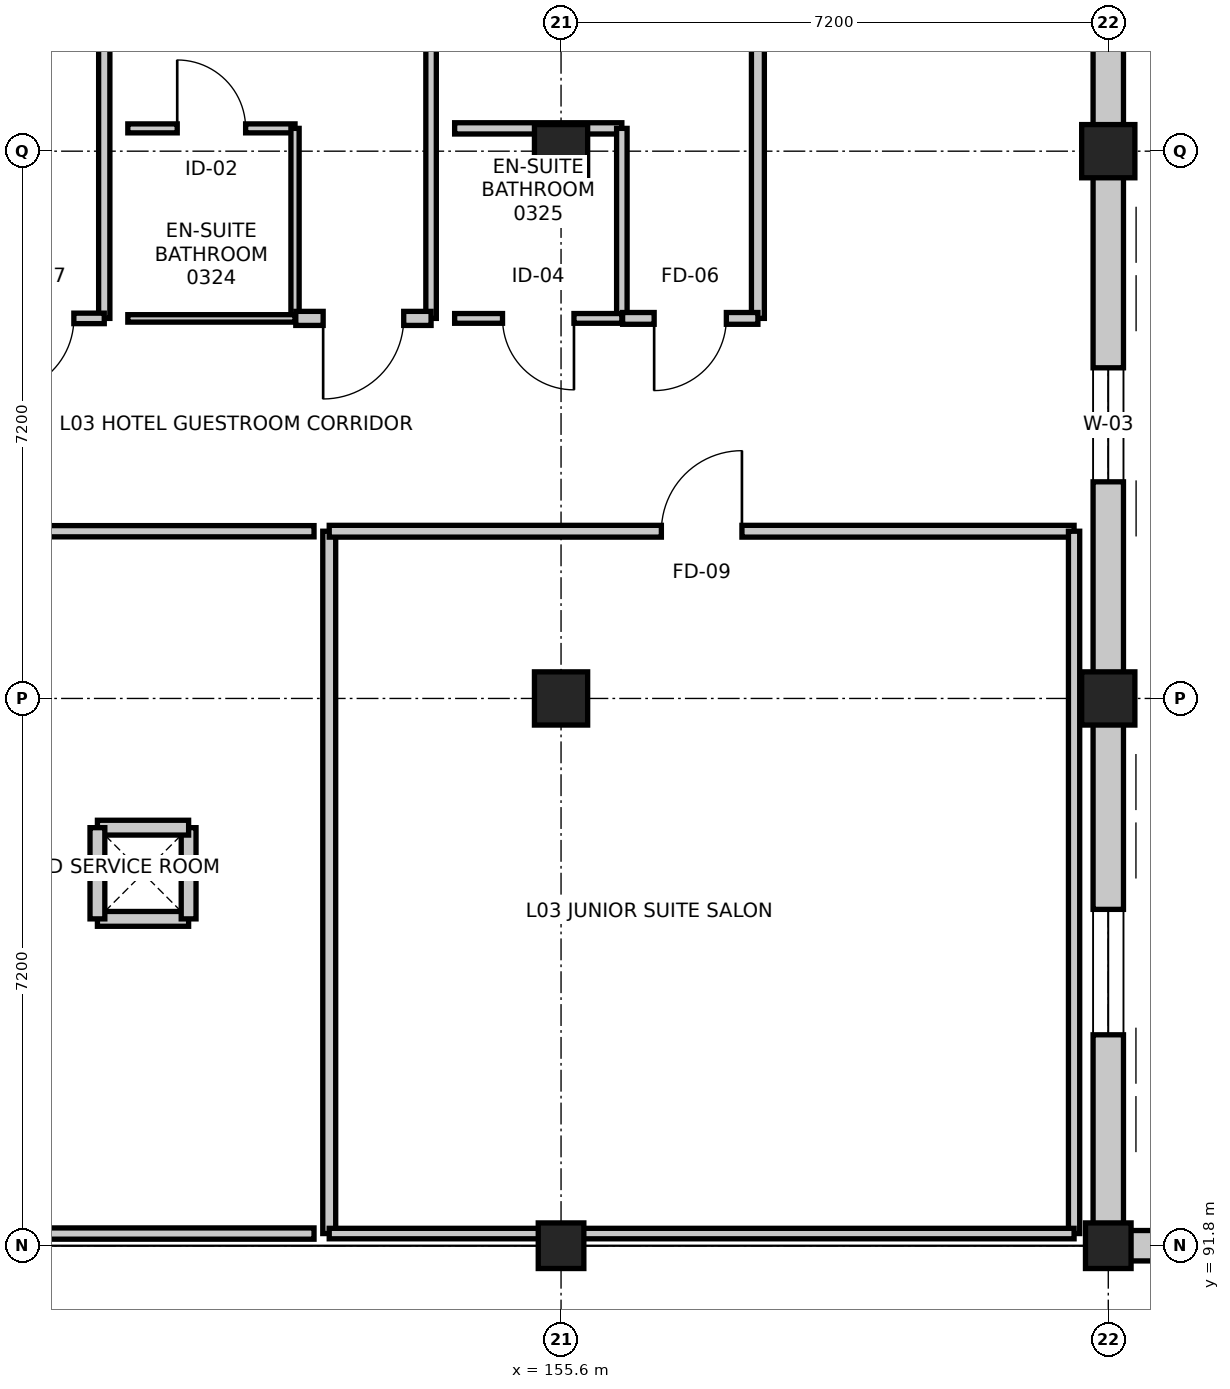
"""IFC4 building model, lengths in metres.
Left out: names, types, materials, properties, quantities, classifications, styles, units other than length and angle.
Written with IfcOpenShell. Run it as: python <this file> out.ifc"""

import sys

from ifc_helpers import new_model, si_unit, direction, frame, frame_2d, origin, origin_2d, place, context, subcontext, project, spatial, rectangle, extrude, element, fill, save


model = new_model("IFC4")
c1 = context("Model", 3, precision=1e-05, world=origin(), true_north=direction((0.0, 1.0)))
c2 = subcontext(c1, "Body", "Model", "MODEL_VIEW")
j1 = project(units=[si_unit("LENGTHUNIT", "METRE"), si_unit("PLANEANGLEUNIT", "RADIAN")], contexts=[c1])
p1 = place(None, origin())
s1 = spatial("IfcSite", under=j1, at=p1, CompositionType="ELEMENT")
p2 = place(p1, origin())
s2 = spatial("IfcBuilding", under=s1, at=p2, CompositionType="ELEMENT")
p3 = place(p2, frame((0.0, 0.0, 15.0)))
s3 = spatial("IfcBuildingStorey", under=s2, at=p3, CompositionType="ELEMENT", Elevation=15.0)
p4 = place(p3, frame((155.6, 91.8, 0.0), z_axis=(0.0, 0.0, 1.0), x_axis=(1.0, 0.0, 0.0)))
e1 = element("IfcColumn", 1, at=p4, inside=s3, PredefinedType="COLUMN", context=c2, shape_type="SweptSolid", body=[
    extrude(rectangle(XDim=0.6, YDim=0.6, at=origin_2d()), origin(), (0.0, 0.0, 1.0), 4.2),
])
for number, where, z_axis, x_axis in (
    (2, (155.6, 99.0, 0.0), (0.0, 0.0, 1.0), (1.0, 0.0, 0.0)),
    (3, (155.6, 106.2, 0.0), (0.0, 0.0, 1.0), (1.0, 0.0, 0.0)),
):
    element("IfcColumn", number, at=place(p3, frame(where, z_axis=z_axis, x_axis=x_axis)), inside=s3, PredefinedType="COLUMN", context=c2, shape_type="SweptSolid", body=[
        extrude(rectangle(XDim=0.7, YDim=0.7, at=origin_2d()), origin(), (0.0, 0.0, 1.0), 4.2),
    ])
p5 = place(p3, frame((162.8, 91.8, 0.0), z_axis=(0.0, 0.0, 1.0), x_axis=(1.0, 0.0, 0.0)))
e4 = element("IfcColumn", 4, at=p5, inside=s3, PredefinedType="COLUMN", context=c2, shape_type="SweptSolid", body=[
    extrude(rectangle(XDim=0.6, YDim=0.6, at=origin_2d()), origin(), (0.0, 0.0, 1.0), 4.2),
])
for number, where, z_axis, x_axis in (
    (5, (162.8, 99.0, 0.0), (0.0, 0.0, 1.0), (1.0, 0.0, 0.0)),
    (6, (162.8, 106.2, 0.0), (0.0, 0.0, 1.0), (1.0, 0.0, 0.0)),
):
    element("IfcColumn", number, at=place(p3, frame(where, z_axis=z_axis, x_axis=x_axis)), inside=s3, PredefinedType="COLUMN", context=c2, shape_type="SweptSolid", body=[
        extrude(rectangle(XDim=0.7, YDim=0.7, at=origin_2d()), origin(), (0.0, 0.0, 1.0), 4.2),
    ])
p6 = place(p3, frame((162.8, 113.4, 0.0), z_axis=(0.0, 0.0, 1.0), x_axis=(0.0, -1.0, 0.0)))
e7 = element("IfcWall", 7, at=p6, inside=s3, PredefinedType="STANDARD", context=c2, shape_type="SweptSolid", body=[
    extrude(rectangle(XDim=7.2, YDim=0.4, at=frame_2d((3.6, 0.0))), origin(), (0.0, 0.0, 1.0), 3.275),
])
p7 = place(p6, frame((2.925, 0.0, 0.9)))
e8 = element("IfcOpeningElement", 8, at=p7, cuts=e7, PredefinedType="OPENING", context=c2, shape_type="SweptSolid", body=[
    extrude(rectangle(XDim=1.35, YDim=1.8, at=frame_2d((0.675, 0.9))), frame((0.0, 0.21, 0.0), z_axis=(0.0, -1.0, 0.0), x_axis=(1.0, 0.0, 0.0)), (0.0, 0.0, 1.0), 0.42),
])
p8 = place(p3, frame((162.8, 106.2, 0.0), z_axis=(0.0, 0.0, 1.0), x_axis=(0.0, -1.0, 0.0)))
e9 = element("IfcWall", 9, at=p8, inside=s3, PredefinedType="STANDARD", context=c2, shape_type="SweptSolid", body=[
    extrude(rectangle(XDim=7.2, YDim=0.4, at=frame_2d((3.6, 0.0))), origin(), (0.0, 0.0, 1.0), 3.275),
])
p9 = place(p8, frame((2.85, 0.0, 0.9)))
e10 = element("IfcOpeningElement", 10, at=p9, cuts=e9, PredefinedType="OPENING", context=c2, shape_type="SweptSolid", body=[
    extrude(rectangle(XDim=1.5, YDim=1.8, at=frame_2d((0.75, 0.9))), frame((0.0, 0.21, 0.0), z_axis=(0.0, -1.0, 0.0), x_axis=(1.0, 0.0, 0.0)), (0.0, 0.0, 1.0), 0.42),
])
p10 = place(p3, frame((162.8, 99.0, 0.0), z_axis=(0.0, 0.0, 1.0), x_axis=(0.0, -1.0, 0.0)))
e11 = element("IfcWall", 11, at=p10, inside=s3, PredefinedType="STANDARD", context=c2, shape_type="SweptSolid", body=[
    extrude(rectangle(XDim=7.2, YDim=0.4, at=frame_2d((3.6, 0.0))), origin(), (0.0, 0.0, 1.0), 3.275),
])
p11 = place(p10, frame((2.775, 0.0, 0.9)))
e12 = element("IfcOpeningElement", 12, at=p11, cuts=e11, PredefinedType="OPENING", context=c2, shape_type="SweptSolid", body=[
    extrude(rectangle(XDim=1.65, YDim=1.8, at=frame_2d((0.825, 0.9))), frame((0.0, 0.21, 0.0), z_axis=(0.0, -1.0, 0.0), x_axis=(1.0, 0.0, 0.0)), (0.0, 0.0, 1.0), 0.42),
])
p12 = place(p3, frame((162.8, 91.8, 0.0), z_axis=(0.0, 0.0, 1.0), x_axis=(1.0, 0.0, 0.0)))
e13 = element("IfcWall", 13, at=p12, inside=s3, PredefinedType="STANDARD", context=c2, shape_type="SweptSolid", body=[
    extrude(rectangle(XDim=7.2, YDim=0.4, at=frame_2d((3.6, 0.0))), origin(), (0.0, 0.0, 1.0), 3.325),
])
p13 = place(p12, frame((2.7, 0.0, 0.9)))
e14 = element("IfcOpeningElement", 14, at=p13, cuts=e13, PredefinedType="OPENING", context=c2, shape_type="SweptSolid", body=[
    extrude(rectangle(XDim=1.8, YDim=1.8, at=frame_2d((0.9, 0.9))), frame((0.0, 0.21, 0.0), z_axis=(0.0, -1.0, 0.0), x_axis=(1.0, 0.0, 0.0)), (0.0, 0.0, 1.0), 0.42),
])
p14 = place(p12, frame((4.95, 0.0, 0.85)))
e15 = element("IfcOpeningElement", 15, at=p14, cuts=e13, PredefinedType="OPENING", context=c2, shape_type="SweptSolid", body=[
    extrude(rectangle(XDim=1.2, YDim=1.8, at=frame_2d((0.6, 0.9))), frame((0.0, 0.21, 0.0), z_axis=(0.0, -1.0, 0.0), x_axis=(1.0, 0.0, 0.0)), (0.0, 0.0, 1.0), 0.42),
])
for number, where, z_axis, x_axis in (
    (16, (149.5, 96.1, 0.0), (0.0, 0.0, 1.0), (1.0, 0.0, 0.0)),
    (17, (150.7, 96.1, 0.0), (0.0, 0.0, 1.0), (0.0, 1.0, 0.0)),
    (18, (150.7, 97.3, 0.0), (0.0, 0.0, 1.0), (-1.0, 0.0, 0.0)),
    (19, (149.5, 97.3, 0.0), (0.0, 0.0, 1.0), (0.0, -1.0, 0.0)),
):
    element("IfcWall", number, at=place(p3, frame(where, z_axis=z_axis, x_axis=x_axis)), inside=s3, PredefinedType="PARAPET", context=c2, shape_type="SweptSolid", body=[
        extrude(rectangle(XDim=1.2, YDim=0.195, at=frame_2d((0.6, 0.0))), origin(), (0.0, 0.0, 1.0), 3.8),
    ])
p15 = place(p3, frame((152.55, 91.96, 0.0), z_axis=(0.0, 0.0, 1.0), x_axis=(0.0, 1.0, 0.0)))
e20 = element("IfcWall", 20, at=p15, inside=s3, PredefinedType="PARTITIONING", context=c2, shape_type="SweptSolid", body=[
    extrude(rectangle(XDim=9.24, YDim=0.17, at=frame_2d((4.62, 0.0))), origin(), (0.0, 0.0, 1.0), 3.325),
])
p16 = place(p3, frame((152.55, 101.2, 0.0), z_axis=(0.0, 0.0, 1.0), x_axis=(1.0, 0.0, 0.0)))
e21 = element("IfcWall", 21, at=p16, inside=s3, PredefinedType="PARTITIONING", context=c2, shape_type="SweptSolid", body=[
    extrude(rectangle(XDim=9.8, YDim=0.155, at=frame_2d((4.9, 0.0))), origin(), (0.0, 0.0, 1.0), 3.275),
])
p17 = place(p16, frame((4.37, 0.0, 0.0)))
e22 = element("IfcOpeningElement", 22, at=p17, cuts=e21, PredefinedType="OPENING", context=c2, shape_type="SweptSolid", body=[
    extrude(rectangle(XDim=1.06, YDim=2.2, at=frame_2d((0.53, 1.1))), frame((0.0, 0.087, 0.0), z_axis=(0.0, -1.0, 0.0), x_axis=(1.0, 0.0, 0.0)), (0.0, 0.0, 1.0), 0.175),
])
p18 = place(p3, frame((162.35, 101.2, 0.0), z_axis=(0.0, 0.0, 1.0), x_axis=(0.0, -1.0, 0.0)))
e23 = element("IfcWall", 23, at=p18, inside=s3, PredefinedType="PARTITIONING", context=c2, shape_type="SweptSolid", body=[
    extrude(rectangle(XDim=9.24, YDim=0.148, at=frame_2d((4.62, 0.0))), origin(), (0.0, 0.0, 1.0), 3.325),
])
p19 = place(p3, frame((162.35, 91.96, 0.0), z_axis=(0.0, 0.0, 1.0), x_axis=(-1.0, 0.0, 0.0)))
e24 = element("IfcWall", 24, at=p19, inside=s3, PredefinedType="PARTITIONING", context=c2, shape_type="SweptSolid", body=[
    extrude(rectangle(XDim=9.8, YDim=0.138, at=frame_2d((4.9, 0.0))), origin(), (0.0, 0.0, 1.0), 3.325),
])
p20 = place(p3, frame((152.35, 91.96, 0.0), z_axis=(0.0, 0.0, 1.0), x_axis=(-1.0, 0.0, 0.0)))
e25 = element("IfcWall", 25, at=p20, inside=s3, PredefinedType="PARTITIONING", context=c2, shape_type="SweptSolid", body=[
    extrude(rectangle(XDim=24.99, YDim=0.148, at=frame_2d((12.495, 0.0))), origin(), (0.0, 0.0, 1.0), 3.325),
])
p21 = place(p3, frame((138.21, 101.2, 0.0), z_axis=(0.0, 0.0, 1.0), x_axis=(1.0, 0.0, 0.0)))
e26 = element("IfcWall", 26, at=p21, inside=s3, PredefinedType="PARTITIONING", context=c2, shape_type="SweptSolid", body=[
    extrude(rectangle(XDim=14.14, YDim=0.148, at=frame_2d((7.07, 0.0))), origin(), (0.0, 0.0, 1.0), 3.275),
])
p22 = place(p3, frame((149.59, 113.55, 0.0), z_axis=(0.0, 0.0, 1.0), x_axis=(0.0, -1.0, 0.0)))
e27 = element("IfcWall", 27, at=p22, inside=s3, PredefinedType="PARTITIONING", context=c2, shape_type="SweptSolid", body=[
    extrude(rectangle(XDim=9.55, YDim=0.148, at=frame_2d((4.775, 0.0))), origin(), (0.0, 0.0, 1.0), 3.325),
])
p23 = place(p3, frame((149.59, 104.0, 0.0), z_axis=(0.0, 0.0, 1.0), x_axis=(-1.0, 0.0, 0.0)))
e28 = element("IfcWall", 28, at=p23, inside=s3, PredefinedType="PARTITIONING", context=c2, shape_type="SweptSolid", body=[
    extrude(rectangle(XDim=1.78, YDim=0.138, at=frame_2d((0.89, 0.0))), origin(), (0.0, 0.0, 1.0), 3.275),
])
p24 = place(p23, frame((0.4, 0.0, 0.0)))
e29 = element("IfcOpeningElement", 29, at=p24, cuts=e28, PredefinedType="OPENING", context=c2, shape_type="SweptSolid", body=[
    extrude(rectangle(XDim=0.98, YDim=2.15, at=frame_2d((0.49, 1.075))), frame((0.0, 0.079, 0.0), z_axis=(0.0, -1.0, 0.0), x_axis=(1.0, 0.0, 0.0)), (0.0, 0.0, 1.0), 0.158),
])
p25 = place(p3, frame((149.9, 106.5, 0.0), z_axis=(0.0, 0.0, 1.0), x_axis=(1.0, 0.0, 0.0)))
e30 = element("IfcWall", 30, at=p25, inside=s3, PredefinedType="PARTITIONING", context=c2, shape_type="SweptSolid", body=[
    extrude(rectangle(XDim=2.2, YDim=0.118, at=frame_2d((1.1, 0.0))), origin(), (0.0, 0.0, 1.0), 3.94),
])
p26 = place(p25, frame((0.65, 0.0, 0.0)))
e31 = element("IfcOpeningElement", 31, at=p26, cuts=e30, PredefinedType="OPENING", context=c2, shape_type="SweptSolid", body=[
    extrude(rectangle(XDim=0.9, YDim=2.08, at=frame_2d((0.45, 1.04))), frame((0.0, 0.069, 0.0), z_axis=(0.0, -1.0, 0.0), x_axis=(1.0, 0.0, 0.0)), (0.0, 0.0, 1.0), 0.138),
])
p27 = place(p3, frame((152.1, 106.5, 0.0), z_axis=(0.0, 0.0, 1.0), x_axis=(0.0, -1.0, 0.0)))
e32 = element("IfcWall", 32, at=p27, inside=s3, PredefinedType="PARTITIONING", context=c2, shape_type="SweptSolid", body=[
    extrude(rectangle(XDim=2.5, YDim=0.108, at=frame_2d((1.25, 0.0))), origin(), (0.0, 0.0, 1.0), 3.325),
])
p28 = place(p3, frame((152.1, 104.0, 0.0), z_axis=(0.0, 0.0, 1.0), x_axis=(-1.0, 0.0, 0.0)))
e33 = element("IfcWall", 33, at=p28, inside=s3, PredefinedType="PARTITIONING", context=c2, shape_type="SweptSolid", body=[
    extrude(rectangle(XDim=2.2, YDim=0.098, at=frame_2d((1.1, 0.0))), origin(), (0.0, 0.0, 1.0), 3.94),
])
p29 = place(p3, frame((153.89, 113.294, 0.0), z_axis=(0.0, 0.0, 1.0), x_axis=(0.0, -1.0, 0.0)))
e34 = element("IfcWall", 34, at=p29, inside=s3, PredefinedType="PARTITIONING", context=c2, shape_type="SweptSolid", body=[
    extrude(rectangle(XDim=9.294, YDim=0.138, at=frame_2d((4.647, 0.0))), origin(), (0.0, 0.0, 1.0), 3.325),
])
p30 = place(p3, frame((153.89, 104.0, 0.0), z_axis=(0.0, 0.0, 1.0), x_axis=(-1.0, 0.0, 0.0)))
e35 = element("IfcWall", 35, at=p30, inside=s3, PredefinedType="PARTITIONING", context=c2, shape_type="SweptSolid", body=[
    extrude(rectangle(XDim=1.78, YDim=0.185, at=frame_2d((0.89, 0.0))), origin(), (0.0, 0.0, 1.0), 3.94),
])
p31 = place(p30, frame((0.36, 0.0, 0.0)))
e36 = element("IfcOpeningElement", 36, at=p31, cuts=e35, PredefinedType="OPENING", context=c2, shape_type="SweptSolid", body=[
    extrude(rectangle(XDim=1.06, YDim=2.2, at=frame_2d((0.53, 1.1))), frame((0.0, 0.103, 0.0), z_axis=(0.0, -1.0, 0.0), x_axis=(1.0, 0.0, 0.0)), (0.0, 0.0, 1.0), 0.205),
])
p32 = place(p3, frame((154.2, 106.5, 0.0), z_axis=(0.0, 0.0, 1.0), x_axis=(1.0, 0.0, 0.0)))
e37 = element("IfcWall", 37, at=p32, inside=s3, PredefinedType="PARTITIONING", context=c2, shape_type="SweptSolid", body=[
    extrude(rectangle(XDim=2.2, YDim=0.148, at=frame_2d((1.1, 0.0))), origin(), (0.0, 0.0, 1.0), 3.275),
])
p33 = place(p3, frame((156.4, 106.5, 0.0), z_axis=(0.0, 0.0, 1.0), x_axis=(0.0, -1.0, 0.0)))
e38 = element("IfcWall", 38, at=p33, inside=s3, PredefinedType="PARTITIONING", context=c2, shape_type="SweptSolid", body=[
    extrude(rectangle(XDim=2.5, YDim=0.138, at=frame_2d((1.25, 0.0))), origin(), (0.0, 0.0, 1.0), 3.325),
])
p34 = place(p3, frame((156.4, 104.0, 0.0), z_axis=(0.0, 0.0, 1.0), x_axis=(-1.0, 0.0, 0.0)))
e39 = element("IfcWall", 39, at=p34, inside=s3, PredefinedType="PARTITIONING", context=c2, shape_type="SweptSolid", body=[
    extrude(rectangle(XDim=2.2, YDim=0.128, at=frame_2d((1.1, 0.0))), origin(), (0.0, 0.0, 1.0), 3.275),
])
p35 = place(p34, frame((0.63, 0.0, 0.0)))
e40 = element("IfcOpeningElement", 40, at=p35, cuts=e39, PredefinedType="OPENING", context=c2, shape_type="SweptSolid", body=[
    extrude(rectangle(XDim=0.94, YDim=2.12, at=frame_2d((0.47, 1.06))), frame((0.0, 0.074, 0.0), z_axis=(0.0, -1.0, 0.0), x_axis=(1.0, 0.0, 0.0)), (0.0, 0.0, 1.0), 0.148),
])
p36 = place(p3, frame((158.19, 113.084, 0.0), z_axis=(0.0, 0.0, 1.0), x_axis=(0.0, -1.0, 0.0)))
e41 = element("IfcWall", 41, at=p36, inside=s3, PredefinedType="PARTITIONING", context=c2, shape_type="SweptSolid", body=[
    extrude(rectangle(XDim=9.084, YDim=0.17, at=frame_2d((4.542, 0.0))), origin(), (0.0, 0.0, 1.0), 3.325),
])
p37 = place(p3, frame((158.19, 104.0, 0.0), z_axis=(0.0, 0.0, 1.0), x_axis=(-1.0, 0.0, 0.0)))
e42 = element("IfcWall", 42, at=p37, inside=s3, PredefinedType="PARTITIONING", context=c2, shape_type="SweptSolid", body=[
    extrude(rectangle(XDim=1.78, YDim=0.155, at=frame_2d((0.89, 0.0))), origin(), (0.0, 0.0, 1.0), 3.94),
])
p38 = place(p37, frame((0.415, 0.0, 0.0)))
e43 = element("IfcOpeningElement", 43, at=p38, cuts=e42, PredefinedType="OPENING", context=c2, shape_type="SweptSolid", body=[
    extrude(rectangle(XDim=0.95, YDim=2.1, at=frame_2d((0.475, 1.05))), frame((0.0, 0.087, 0.0), z_axis=(0.0, -1.0, 0.0), x_axis=(1.0, 0.0, 0.0)), (0.0, 0.0, 1.0), 0.175),
])
p39 = place(p9, origin())
e44 = element("IfcWindow", 44, at=p39, inside=s3, PartitioningType="SINGLE_PANEL", PredefinedType="WINDOW", context=c2, shape_type="SweptSolid", body=[
    extrude(rectangle(XDim=1.5, YDim=1.8, at=frame_2d((0.75, 0.9))), frame((0.0, 0.03, 0.0), z_axis=(0.0, -1.0, 0.0), x_axis=(1.0, 0.0, 0.0)), (0.0, 0.0, 1.0), 0.06),
])
fill(e10, e44)
p40 = place(p11, origin())
e45 = element("IfcWindow", 45, at=p40, inside=s3, PartitioningType="SINGLE_PANEL", PredefinedType="WINDOW", context=c2, shape_type="SweptSolid", body=[
    extrude(rectangle(XDim=1.65, YDim=1.8, at=frame_2d((0.825, 0.9))), frame((0.0, 0.03, 0.0), z_axis=(0.0, -1.0, 0.0), x_axis=(1.0, 0.0, 0.0)), (0.0, 0.0, 1.0), 0.06),
])
fill(e12, e45)
p41 = place(p17, origin())
e46 = element("IfcDoor", 46, at=p41, inside=s3, OperationType="SINGLE_SWING_RIGHT", PredefinedType="DOOR", context=c2, shape_type="SweptSolid", body=[
    extrude(rectangle(XDim=1.06, YDim=2.2, at=frame_2d((0.53, 1.1))), frame((0.0, 0.025, 0.0), z_axis=(0.0, -1.0, 0.0), x_axis=(1.0, 0.0, 0.0)), (0.0, 0.0, 1.0), 0.05),
])
fill(e22, e46)
p42 = place(p24, origin())
e47 = element("IfcDoor", 47, at=p42, inside=s3, OperationType="SINGLE_SWING_RIGHT", PredefinedType="DOOR", context=c2, shape_type="SweptSolid", body=[
    extrude(rectangle(XDim=0.98, YDim=2.15, at=frame_2d((0.49, 1.075))), frame((0.0, 0.025, 0.0), z_axis=(0.0, -1.0, 0.0), x_axis=(1.0, 0.0, 0.0)), (0.0, 0.0, 1.0), 0.05),
])
fill(e29, e47)
p43 = place(p26, origin())
e48 = element("IfcDoor", 48, at=p43, inside=s3, OperationType="SINGLE_SWING_LEFT", PredefinedType="DOOR", context=c2, shape_type="SweptSolid", body=[
    extrude(rectangle(XDim=0.9, YDim=2.08, at=frame_2d((0.45, 1.04))), frame((0.0, 0.025, 0.0), z_axis=(0.0, -1.0, 0.0), x_axis=(1.0, 0.0, 0.0)), (0.0, 0.0, 1.0), 0.05),
])
fill(e31, e48)
p44 = place(p31, origin())
e49 = element("IfcDoor", 49, at=p44, inside=s3, OperationType="SINGLE_SWING_RIGHT", PredefinedType="DOOR", context=c2, shape_type="SweptSolid", body=[
    extrude(rectangle(XDim=1.06, YDim=2.2, at=frame_2d((0.53, 1.1))), frame((0.0, 0.025, 0.0), z_axis=(0.0, -1.0, 0.0), x_axis=(1.0, 0.0, 0.0)), (0.0, 0.0, 1.0), 0.05),
])
fill(e36, e49)
p45 = place(p35, origin())
e50 = element("IfcDoor", 50, at=p45, inside=s3, OperationType="SINGLE_SWING_LEFT", PredefinedType="DOOR", context=c2, shape_type="SweptSolid", body=[
    extrude(rectangle(XDim=0.94, YDim=2.12, at=frame_2d((0.47, 1.06))), frame((0.0, 0.025, 0.0), z_axis=(0.0, -1.0, 0.0), x_axis=(1.0, 0.0, 0.0)), (0.0, 0.0, 1.0), 0.05),
])
fill(e40, e50)
p46 = place(p38, origin())
e51 = element("IfcDoor", 51, at=p46, inside=s3, OperationType="SINGLE_SWING_RIGHT", PredefinedType="DOOR", context=c2, shape_type="SweptSolid", body=[
    extrude(rectangle(XDim=0.95, YDim=2.1, at=frame_2d((0.475, 1.05))), frame((0.0, 0.025, 0.0), z_axis=(0.0, -1.0, 0.0), x_axis=(1.0, 0.0, 0.0)), (0.0, 0.0, 1.0), 0.05),
])
fill(e43, e51)
save(model, sys.argv[1])
